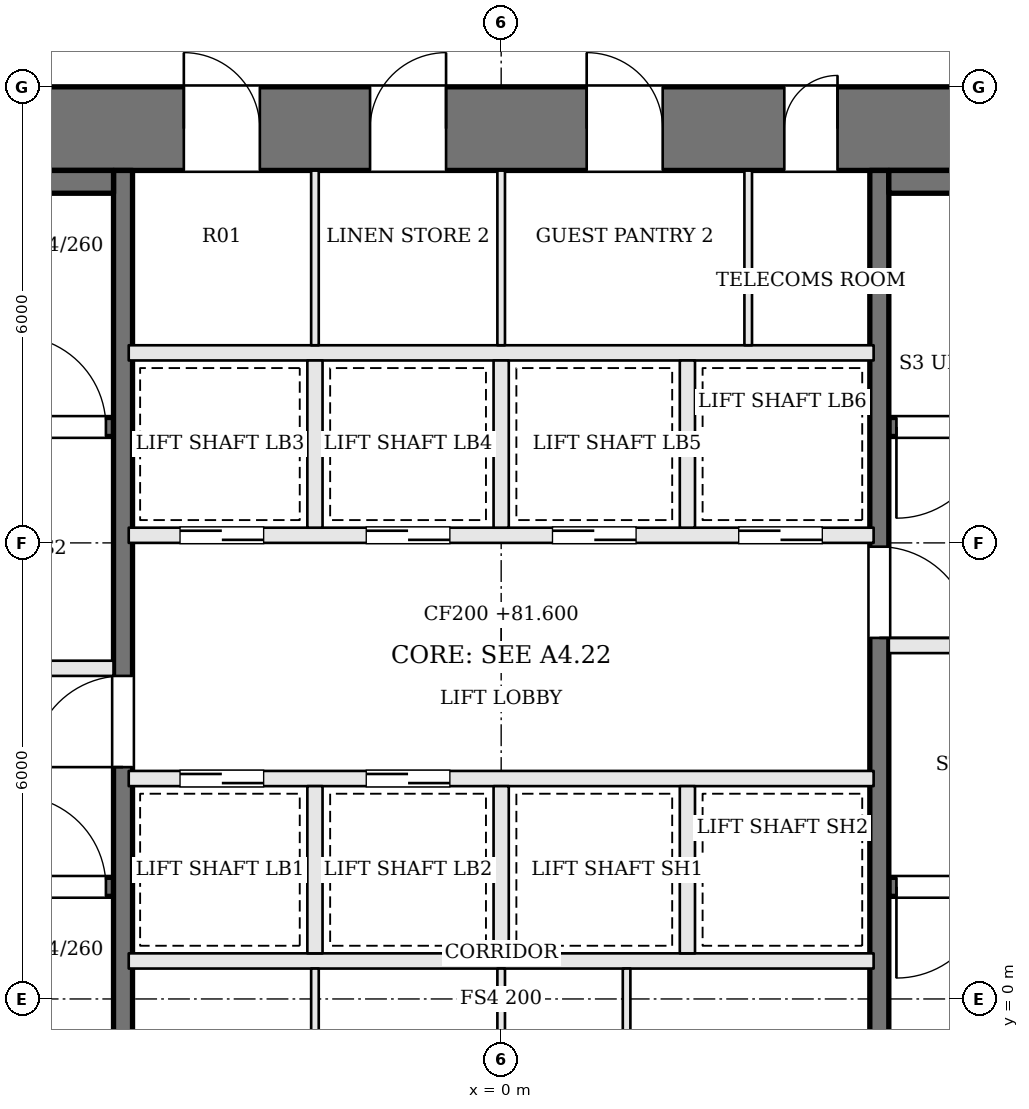
"""IFC4 building model, lengths in metres.
Left out: names, types, materials, properties, quantities, classifications, styles, units other than length and angle.
Written with IfcOpenShell. Run it as: python <this file> out.ifc"""

import sys

from ifc_helpers import new_model, si_unit, direction, frame, frame_2d, origin, place, context, subcontext, project, spatial, rectangle, extrude, element, fill, save


model = new_model("IFC4")
c1 = context("Model", 3, precision=1e-05, world=origin(), true_north=direction((0.0, 1.0)))
c2 = subcontext(c1, "Body", "Model", "MODEL_VIEW")
j1 = project(units=[si_unit("LENGTHUNIT", "METRE"), si_unit("PLANEANGLEUNIT", "RADIAN")], contexts=[c1])
p1 = place(None, origin())
s1 = spatial("IfcSite", under=j1, at=p1, CompositionType="ELEMENT")
p2 = place(p1, origin())
s2 = spatial("IfcBuilding", under=s1, at=p2, CompositionType="ELEMENT")
p3 = place(p2, frame((0.0, 0.0, 81.6)))
s3 = spatial("IfcBuildingStorey", under=s2, at=p3, CompositionType="ELEMENT", Elevation=81.6)
p4 = place(p3, frame((-13.0, 11.45, 0.0), z_axis=(0.0, 0.0, 1.0), x_axis=(1.0, 0.0, 0.0)))
e1 = element("IfcWall", 1, at=p4, inside=s3, PredefinedType="SHEAR", context=c2, shape_type="SweptSolid", body=[
    extrude(rectangle(XDim=26.0, YDim=1.1, at=frame_2d((13.0, 0.0))), origin(), (0.0, 0.0, 1.0), 3.6),
])
p5 = place(p4, frame((8.825, 0.0, 0.0)))
e2 = element("IfcOpeningElement", 2, at=p5, cuts=e1, PredefinedType="OPENING", context=c2, shape_type="SweptSolid", body=[
    extrude(rectangle(XDim=1.0, YDim=2.1, at=frame_2d((0.5, 1.05))), frame((0.0, 0.56, 0.0), z_axis=(0.0, -1.0, 0.0), x_axis=(1.0, 0.0, 0.0)), (0.0, 0.0, 1.0), 1.12),
])
p6 = place(p4, frame((11.275, 0.0, 0.0)))
e3 = element("IfcOpeningElement", 3, at=p6, cuts=e1, PredefinedType="OPENING", context=c2, shape_type="SweptSolid", body=[
    extrude(rectangle(XDim=1.0, YDim=2.1, at=frame_2d((0.5, 1.05))), frame((0.0, 0.56, 0.0), z_axis=(0.0, -1.0, 0.0), x_axis=(1.0, 0.0, 0.0)), (0.0, 0.0, 1.0), 1.12),
])
p7 = place(p4, frame((14.125, 0.0, 0.0)))
e4 = element("IfcOpeningElement", 4, at=p7, cuts=e1, PredefinedType="OPENING", context=c2, shape_type="SweptSolid", body=[
    extrude(rectangle(XDim=1.0, YDim=2.1, at=frame_2d((0.5, 1.05))), frame((0.0, 0.56, 0.0), z_axis=(0.0, -1.0, 0.0), x_axis=(1.0, 0.0, 0.0)), (0.0, 0.0, 1.0), 1.12),
])
p8 = place(p4, frame((16.725, 0.0, 0.0)))
e5 = element("IfcOpeningElement", 5, at=p8, cuts=e1, PredefinedType="OPENING", context=c2, shape_type="SweptSolid", body=[
    extrude(rectangle(XDim=0.7, YDim=2.1, at=frame_2d((0.35, 1.05))), frame((0.0, 0.56, 0.0), z_axis=(0.0, -1.0, 0.0), x_axis=(1.0, 0.0, 0.0)), (0.0, 0.0, 1.0), 1.12),
])
p9 = place(p3, frame((-11.9, 1.475, 0.0), z_axis=(0.0, 0.0, 1.0), x_axis=(1.0, 0.0, 0.0)))
e6 = element("IfcWall", 6, at=p9, inside=s3, PredefinedType="SOLIDWALL", context=c2, shape_type="SweptSolid", body=[
    extrude(rectangle(XDim=6.8, YDim=0.25, at=frame_2d((3.4, 0.0))), origin(), (0.0, 0.0, 1.0), 3.4),
])
p10 = place(p9, frame((5.5, 0.0, 0.0)))
e7 = element("IfcOpeningElement", 7, at=p10, cuts=e6, PredefinedType="OPENING", context=c2, shape_type="SweptSolid", body=[
    extrude(rectangle(XDim=1.2, YDim=2.1, at=frame_2d((0.6, 1.05))), frame((0.0, 0.135, 0.0), z_axis=(0.0, -1.0, 0.0), x_axis=(1.0, 0.0, 0.0)), (0.0, 0.0, 1.0), 0.27),
])
p11 = place(p3, frame((11.9, 7.525, 0.0), z_axis=(0.0, 0.0, 1.0), x_axis=(-1.0, 0.0, 0.0)))
e8 = element("IfcWall", 8, at=p11, inside=s3, PredefinedType="SOLIDWALL", context=c2, shape_type="SweptSolid", body=[
    extrude(rectangle(XDim=6.8, YDim=0.25, at=frame_2d((3.4, 0.0))), origin(), (0.0, 0.0, 1.0), 3.4),
])
p12 = place(p11, frame((5.5, 0.0, 0.0)))
e9 = element("IfcOpeningElement", 9, at=p12, cuts=e8, PredefinedType="OPENING", context=c2, shape_type="SweptSolid", body=[
    extrude(rectangle(XDim=1.2, YDim=2.1, at=frame_2d((0.6, 1.05))), frame((0.0, 0.135, 0.0), z_axis=(0.0, -1.0, 0.0), x_axis=(1.0, 0.0, 0.0)), (0.0, 0.0, 1.0), 0.27),
])
p13 = place(p3, frame((-11.9, 4.35, 0.0), z_axis=(0.0, 0.0, 1.0), x_axis=(1.0, 0.0, 0.0)))
e10 = element("IfcWall", 10, at=p13, inside=s3, PredefinedType="SOLIDWALL", context=c2, shape_type="SweptSolid", body=[
    extrude(rectangle(XDim=6.8, YDim=0.2, at=frame_2d((3.4, 0.0))), origin(), (0.0, 0.0, 1.0), 3.4),
])
p14 = place(p13, frame((4.1, 0.0, 0.0)))
e11 = element("IfcOpeningElement", 11, at=p14, cuts=e10, PredefinedType="OPENING", context=c2, shape_type="SweptSolid", body=[
    extrude(rectangle(XDim=1.2, YDim=2.1, at=frame_2d((0.6, 1.05))), frame((0.0, 0.11, 0.0), z_axis=(0.0, -1.0, 0.0), x_axis=(1.0, 0.0, 0.0)), (0.0, 0.0, 1.0), 0.22),
])
p15 = place(p13, frame((0.8, 0.0, 0.0)))
e12 = element("IfcOpeningElement", 12, at=p15, cuts=e10, PredefinedType="OPENING", context=c2, shape_type="SweptSolid", body=[
    extrude(rectangle(XDim=1.2, YDim=2.1, at=frame_2d((0.6, 1.05))), frame((0.0, 0.11, 0.0), z_axis=(0.0, -1.0, 0.0), x_axis=(1.0, 0.0, 0.0)), (0.0, 0.0, 1.0), 0.22),
])
p16 = place(p3, frame((11.9, 4.65, 0.0), z_axis=(0.0, 0.0, 1.0), x_axis=(-1.0, 0.0, 0.0)))
e13 = element("IfcWall", 13, at=p16, inside=s3, PredefinedType="SOLIDWALL", context=c2, shape_type="SweptSolid", body=[
    extrude(rectangle(XDim=6.8, YDim=0.2, at=frame_2d((3.4, 0.0))), origin(), (0.0, 0.0, 1.0), 3.4),
])
p17 = place(p16, frame((4.1, 0.0, 0.0)))
e14 = element("IfcOpeningElement", 14, at=p17, cuts=e13, PredefinedType="OPENING", context=c2, shape_type="SweptSolid", body=[
    extrude(rectangle(XDim=1.2, YDim=2.1, at=frame_2d((0.6, 1.05))), frame((0.0, 0.11, 0.0), z_axis=(0.0, -1.0, 0.0), x_axis=(1.0, 0.0, 0.0)), (0.0, 0.0, 1.0), 0.22),
])
p18 = place(p16, frame((0.8, 0.0, 0.0)))
e15 = element("IfcOpeningElement", 15, at=p18, cuts=e13, PredefinedType="OPENING", context=c2, shape_type="SweptSolid", body=[
    extrude(rectangle(XDim=1.2, YDim=2.1, at=frame_2d((0.6, 1.05))), frame((0.0, 0.11, 0.0), z_axis=(0.0, -1.0, 0.0), x_axis=(1.0, 0.0, 0.0)), (0.0, 0.0, 1.0), 0.22),
])
p19 = place(p3, frame((-11.9, 7.525, 0.0), z_axis=(0.0, 0.0, 1.0), x_axis=(1.0, 0.0, 0.0)))
e16 = element("IfcWall", 16, at=p19, inside=s3, PredefinedType="SOLIDWALL", context=c2, shape_type="SweptSolid", body=[
    extrude(rectangle(XDim=6.8, YDim=0.25, at=frame_2d((3.4, 0.0))), origin(), (0.0, 0.0, 1.0), 3.4),
])
p20 = place(p19, frame((5.5, 0.0, 0.0)))
e17 = element("IfcOpeningElement", 17, at=p20, cuts=e16, PredefinedType="OPENING", context=c2, shape_type="SweptSolid", body=[
    extrude(rectangle(XDim=1.2, YDim=2.1, at=frame_2d((0.6, 1.05))), frame((0.0, 0.135, 0.0), z_axis=(0.0, -1.0, 0.0), x_axis=(1.0, 0.0, 0.0)), (0.0, 0.0, 1.0), 0.27),
])
p21 = place(p3, frame((11.9, 1.475, 0.0), z_axis=(0.0, 0.0, 1.0), x_axis=(-1.0, 0.0, 0.0)))
e18 = element("IfcWall", 18, at=p21, inside=s3, PredefinedType="SOLIDWALL", context=c2, shape_type="SweptSolid", body=[
    extrude(rectangle(XDim=6.8, YDim=0.25, at=frame_2d((3.4, 0.0))), origin(), (0.0, 0.0, 1.0), 3.4),
])
p22 = place(p21, frame((5.5, 0.0, 0.0)))
e19 = element("IfcOpeningElement", 19, at=p22, cuts=e18, PredefinedType="OPENING", context=c2, shape_type="SweptSolid", body=[
    extrude(rectangle(XDim=1.2, YDim=2.1, at=frame_2d((0.6, 1.05))), frame((0.0, 0.135, 0.0), z_axis=(0.0, -1.0, 0.0), x_axis=(1.0, 0.0, 0.0)), (0.0, 0.0, 1.0), 0.27),
])
p23 = place(p3, frame((-4.975, -1.9, 0.0), z_axis=(0.0, 0.0, 1.0), x_axis=(0.0, 1.0, 0.0)))
e20 = element("IfcWall", 20, at=p23, inside=s3, PredefinedType="SOLIDWALL", context=c2, shape_type="SweptSolid", body=[
    extrude(rectangle(XDim=12.8, YDim=0.25, at=frame_2d((6.4, 0.0))), origin(), (0.0, 0.0, 1.0), 3.4),
])
p24 = place(p23, frame((4.95, 0.0, 0.0)))
e21 = element("IfcOpeningElement", 21, at=p24, cuts=e20, PredefinedType="OPENING", context=c2, shape_type="SweptSolid", body=[
    extrude(rectangle(XDim=1.2, YDim=2.1, at=frame_2d((0.6, 1.05))), frame((0.0, 0.135, 0.0), z_axis=(0.0, -1.0, 0.0), x_axis=(1.0, 0.0, 0.0)), (0.0, 0.0, 1.0), 0.27),
])
p25 = place(p3, frame((4.975, 10.9, 0.0), z_axis=(0.0, 0.0, 1.0), x_axis=(0.0, -1.0, 0.0)))
e22 = element("IfcWall", 22, at=p25, inside=s3, PredefinedType="SOLIDWALL", context=c2, shape_type="SweptSolid", body=[
    extrude(rectangle(XDim=12.8, YDim=0.25, at=frame_2d((6.4, 0.0))), origin(), (0.0, 0.0, 1.0), 3.4),
])
p26 = place(p25, frame((4.95, 0.0, 0.0)))
e23 = element("IfcOpeningElement", 23, at=p26, cuts=e22, PredefinedType="OPENING", context=c2, shape_type="SweptSolid", body=[
    extrude(rectangle(XDim=1.2, YDim=2.1, at=frame_2d((0.6, 1.05))), frame((0.0, 0.135, 0.0), z_axis=(0.0, -1.0, 0.0), x_axis=(1.0, 0.0, 0.0)), (0.0, 0.0, 1.0), 0.27),
])
for number, where, z_axis, x_axis in (
    (24, (-11.9, 10.75, 0.0), (0.0, 0.0, 1.0), (1.0, 0.0, 0.0)),
    (25, (11.9, 10.75, 0.0), (0.0, 0.0, 1.0), (-1.0, 0.0, 0.0)),
):
    element("IfcWall", number, at=place(p3, frame(where, z_axis=z_axis, x_axis=x_axis)), inside=s3, PredefinedType="SOLIDWALL", context=c2, shape_type="SweptSolid", body=[
        extrude(rectangle(XDim=6.8, YDim=0.3, at=frame_2d((3.4, 0.0))), origin(), (0.0, 0.0, 1.0), 3.4),
    ])
p27 = place(p3, frame((-4.9, 0.5, 0.0), z_axis=(0.0, 0.0, 1.0), x_axis=(1.0, 0.0, 0.0)))
e26 = element("IfcWall", 26, at=p27, inside=s3, PredefinedType="SOLIDWALL", context=c2, shape_type="SweptSolid", body=[
    extrude(rectangle(XDim=9.8, YDim=0.2, at=frame_2d((4.9, 0.0))), origin(), (0.0, 0.0, 1.0), 3.4),
])
p28 = place(p3, frame((-4.9, 2.9, 0.0), z_axis=(0.0, 0.0, 1.0), x_axis=(1.0, 0.0, 0.0)))
e27 = element("IfcWall", 27, at=p28, inside=s3, PredefinedType="SOLIDWALL", context=c2, shape_type="SweptSolid", body=[
    extrude(rectangle(XDim=9.8, YDim=0.2, at=frame_2d((4.9, 0.0))), origin(), (0.0, 0.0, 1.0), 3.4),
])
p29 = place(p28, frame((0.675, 0.0, 0.0)))
e28 = element("IfcOpeningElement", 28, at=p29, cuts=e27, PredefinedType="OPENING", context=c2, shape_type="SweptSolid", body=[
    extrude(rectangle(XDim=1.1, YDim=2.1, at=frame_2d((0.55, 1.05))), frame((0.0, 0.11, 0.0), z_axis=(0.0, -1.0, 0.0), x_axis=(1.0, 0.0, 0.0)), (0.0, 0.0, 1.0), 0.22),
])
p30 = place(p28, frame((3.125, 0.0, 0.0)))
e29 = element("IfcOpeningElement", 29, at=p30, cuts=e27, PredefinedType="OPENING", context=c2, shape_type="SweptSolid", body=[
    extrude(rectangle(XDim=1.1, YDim=2.1, at=frame_2d((0.55, 1.05))), frame((0.0, 0.11, 0.0), z_axis=(0.0, -1.0, 0.0), x_axis=(1.0, 0.0, 0.0)), (0.0, 0.0, 1.0), 0.22),
])
p31 = place(p3, frame((-4.9, 6.1, 0.0), z_axis=(0.0, 0.0, 1.0), x_axis=(1.0, 0.0, 0.0)))
e30 = element("IfcWall", 30, at=p31, inside=s3, PredefinedType="SOLIDWALL", context=c2, shape_type="SweptSolid", body=[
    extrude(rectangle(XDim=9.8, YDim=0.2, at=frame_2d((4.9, 0.0))), origin(), (0.0, 0.0, 1.0), 3.4),
])
p32 = place(p31, frame((0.675, 0.0, 0.0)))
e31 = element("IfcOpeningElement", 31, at=p32, cuts=e30, PredefinedType="OPENING", context=c2, shape_type="SweptSolid", body=[
    extrude(rectangle(XDim=1.1, YDim=2.1, at=frame_2d((0.55, 1.05))), frame((0.0, 0.11, 0.0), z_axis=(0.0, -1.0, 0.0), x_axis=(1.0, 0.0, 0.0)), (0.0, 0.0, 1.0), 0.22),
])
p33 = place(p31, frame((3.125, 0.0, 0.0)))
e32 = element("IfcOpeningElement", 32, at=p33, cuts=e30, PredefinedType="OPENING", context=c2, shape_type="SweptSolid", body=[
    extrude(rectangle(XDim=1.1, YDim=2.1, at=frame_2d((0.55, 1.05))), frame((0.0, 0.11, 0.0), z_axis=(0.0, -1.0, 0.0), x_axis=(1.0, 0.0, 0.0)), (0.0, 0.0, 1.0), 0.22),
])
p34 = place(p31, frame((5.575, 0.0, 0.0)))
e33 = element("IfcOpeningElement", 33, at=p34, cuts=e30, PredefinedType="OPENING", context=c2, shape_type="SweptSolid", body=[
    extrude(rectangle(XDim=1.1, YDim=2.1, at=frame_2d((0.55, 1.05))), frame((0.0, 0.11, 0.0), z_axis=(0.0, -1.0, 0.0), x_axis=(1.0, 0.0, 0.0)), (0.0, 0.0, 1.0), 0.22),
])
p35 = place(p31, frame((8.025, 0.0, 0.0)))
e34 = element("IfcOpeningElement", 34, at=p35, cuts=e30, PredefinedType="OPENING", context=c2, shape_type="SweptSolid", body=[
    extrude(rectangle(XDim=1.1, YDim=2.1, at=frame_2d((0.55, 1.05))), frame((0.0, 0.11, 0.0), z_axis=(0.0, -1.0, 0.0), x_axis=(1.0, 0.0, 0.0)), (0.0, 0.0, 1.0), 0.22),
])
p36 = place(p3, frame((-4.9, 8.5, 0.0), z_axis=(0.0, 0.0, 1.0), x_axis=(1.0, 0.0, 0.0)))
e35 = element("IfcWall", 35, at=p36, inside=s3, PredefinedType="SOLIDWALL", context=c2, shape_type="SweptSolid", body=[
    extrude(rectangle(XDim=9.8, YDim=0.2, at=frame_2d((4.9, 0.0))), origin(), (0.0, 0.0, 1.0), 3.4),
])
for number, where, z_axis, x_axis in (
    (36, (-2.45, 0.6, 0.0), (0.0, 0.0, 1.0), (0.0, 1.0, 0.0)),
    (37, (0.0, 0.6, 0.0), (0.0, 0.0, 1.0), (0.0, 1.0, 0.0)),
    (38, (2.45, 0.6, 0.0), (0.0, 0.0, 1.0), (0.0, 1.0, 0.0)),
    (39, (-2.45, 6.2, 0.0), (0.0, 0.0, 1.0), (0.0, 1.0, 0.0)),
    (40, (0.0, 6.2, 0.0), (0.0, 0.0, 1.0), (0.0, 1.0, 0.0)),
    (41, (2.45, 6.2, 0.0), (0.0, 0.0, 1.0), (0.0, 1.0, 0.0)),
):
    element("IfcWall", number, at=place(p3, frame(where, z_axis=z_axis, x_axis=x_axis)), inside=s3, PredefinedType="SOLIDWALL", context=c2, shape_type="SweptSolid", body=[
        extrude(rectangle(XDim=2.2, YDim=0.2, at=frame_2d((1.1, 0.0))), origin(), (0.0, 0.0, 1.0), 3.4),
    ])
for number, where, z_axis, x_axis in (
    (42, (-2.45, -1.9, 0.0), (0.0, 0.0, 1.0), (0.0, 1.0, 0.0)),
    (43, (0.0, -1.9, 0.0), (0.0, 0.0, 1.0), (0.0, 1.0, 0.0)),
    (44, (1.65, -1.9, 0.0), (0.0, 0.0, 1.0), (0.0, 1.0, 0.0)),
    (45, (-2.45, 8.6, 0.0), (0.0, 0.0, 1.0), (0.0, 1.0, 0.0)),
    (46, (0.0, 8.6, 0.0), (0.0, 0.0, 1.0), (0.0, 1.0, 0.0)),
    (47, (3.25, 8.6, 0.0), (0.0, 0.0, 1.0), (0.0, 1.0, 0.0)),
):
    element("IfcWall", number, at=place(p3, frame(where, z_axis=z_axis, x_axis=x_axis)), inside=s3, PredefinedType="PARTITIONING", context=c2, shape_type="SweptSolid", body=[
        extrude(rectangle(XDim=2.3, YDim=0.1, at=frame_2d((1.15, 0.0))), origin(), (0.0, 0.0, 1.0), 3.4),
    ])
p37 = place(p24, origin())
e48 = element("IfcDoor", 48, at=p37, inside=s3, OperationType="SINGLE_SWING_LEFT", PredefinedType="DOOR", context=c2, shape_type="SweptSolid", body=[
    extrude(rectangle(XDim=1.2, YDim=2.1, at=frame_2d((0.6, 1.05))), frame((0.0, 0.025, 0.0), z_axis=(0.0, -1.0, 0.0), x_axis=(1.0, 0.0, 0.0)), (0.0, 0.0, 1.0), 0.05),
])
fill(e21, e48)
p38 = place(p26, origin())
e49 = element("IfcDoor", 49, at=p38, inside=s3, OperationType="SINGLE_SWING_RIGHT", PredefinedType="DOOR", context=c2, shape_type="SweptSolid", body=[
    extrude(rectangle(XDim=1.2, YDim=2.1, at=frame_2d((0.6, 1.05))), frame((0.0, 0.025, 0.0), z_axis=(0.0, -1.0, 0.0), x_axis=(1.0, 0.0, 0.0)), (0.0, 0.0, 1.0), 0.05),
])
fill(e23, e49)
p39 = place(p10, origin())
e50 = element("IfcDoor", 50, at=p39, inside=s3, OperationType="SINGLE_SWING_LEFT", PredefinedType="DOOR", context=c2, shape_type="SweptSolid", body=[
    extrude(rectangle(XDim=1.2, YDim=2.1, at=frame_2d((0.6, 1.05))), frame((0.0, 0.025, 0.0), z_axis=(0.0, -1.0, 0.0), x_axis=(1.0, 0.0, 0.0)), (0.0, 0.0, 1.0), 0.05),
])
fill(e7, e50)
p40 = place(p12, origin())
e51 = element("IfcDoor", 51, at=p40, inside=s3, OperationType="SINGLE_SWING_RIGHT", PredefinedType="DOOR", context=c2, shape_type="SweptSolid", body=[
    extrude(rectangle(XDim=1.2, YDim=2.1, at=frame_2d((0.6, 1.05))), frame((0.0, 0.025, 0.0), z_axis=(0.0, -1.0, 0.0), x_axis=(1.0, 0.0, 0.0)), (0.0, 0.0, 1.0), 0.05),
])
fill(e9, e51)
p41 = place(p20, origin())
e52 = element("IfcDoor", 52, at=p41, inside=s3, OperationType="SINGLE_SWING_LEFT", PredefinedType="DOOR", context=c2, shape_type="SweptSolid", body=[
    extrude(rectangle(XDim=1.2, YDim=2.1, at=frame_2d((0.6, 1.05))), frame((0.0, 0.025, 0.0), z_axis=(0.0, -1.0, 0.0), x_axis=(1.0, 0.0, 0.0)), (0.0, 0.0, 1.0), 0.05),
])
fill(e17, e52)
p42 = place(p22, origin())
e53 = element("IfcDoor", 53, at=p42, inside=s3, OperationType="SINGLE_SWING_RIGHT", PredefinedType="DOOR", context=c2, shape_type="SweptSolid", body=[
    extrude(rectangle(XDim=1.2, YDim=2.1, at=frame_2d((0.6, 1.05))), frame((0.0, 0.025, 0.0), z_axis=(0.0, -1.0, 0.0), x_axis=(1.0, 0.0, 0.0)), (0.0, 0.0, 1.0), 0.05),
])
fill(e19, e53)
p43 = place(p29, origin())
e54 = element("IfcDoor", 54, at=p43, inside=s3, OperationType="SLIDING_TO_RIGHT", PredefinedType="DOOR", context=c2, shape_type="SweptSolid", body=[
    extrude(rectangle(XDim=1.1, YDim=2.1, at=frame_2d((0.55, 1.05))), frame((0.0, 0.025, 0.0), z_axis=(0.0, -1.0, 0.0), x_axis=(1.0, 0.0, 0.0)), (0.0, 0.0, 1.0), 0.05),
])
fill(e28, e54)
p44 = place(p30, origin())
e55 = element("IfcDoor", 55, at=p44, inside=s3, OperationType="SLIDING_TO_LEFT", PredefinedType="DOOR", context=c2, shape_type="SweptSolid", body=[
    extrude(rectangle(XDim=1.1, YDim=2.1, at=frame_2d((0.55, 1.05))), frame((0.0, 0.025, 0.0), z_axis=(0.0, -1.0, 0.0), x_axis=(1.0, 0.0, 0.0)), (0.0, 0.0, 1.0), 0.05),
])
fill(e29, e55)
p45 = place(p32, origin())
e56 = element("IfcDoor", 56, at=p45, inside=s3, OperationType="SLIDING_TO_RIGHT", PredefinedType="DOOR", context=c2, shape_type="SweptSolid", body=[
    extrude(rectangle(XDim=1.1, YDim=2.1, at=frame_2d((0.55, 1.05))), frame((0.0, 0.025, 0.0), z_axis=(0.0, -1.0, 0.0), x_axis=(1.0, 0.0, 0.0)), (0.0, 0.0, 1.0), 0.05),
])
fill(e31, e56)
p46 = place(p33, origin())
e57 = element("IfcDoor", 57, at=p46, inside=s3, OperationType="SLIDING_TO_LEFT", PredefinedType="DOOR", context=c2, shape_type="SweptSolid", body=[
    extrude(rectangle(XDim=1.1, YDim=2.1, at=frame_2d((0.55, 1.05))), frame((0.0, 0.025, 0.0), z_axis=(0.0, -1.0, 0.0), x_axis=(1.0, 0.0, 0.0)), (0.0, 0.0, 1.0), 0.05),
])
fill(e32, e57)
p47 = place(p34, origin())
e58 = element("IfcDoor", 58, at=p47, inside=s3, OperationType="SLIDING_TO_RIGHT", PredefinedType="DOOR", context=c2, shape_type="SweptSolid", body=[
    extrude(rectangle(XDim=1.1, YDim=2.1, at=frame_2d((0.55, 1.05))), frame((0.0, 0.025, 0.0), z_axis=(0.0, -1.0, 0.0), x_axis=(1.0, 0.0, 0.0)), (0.0, 0.0, 1.0), 0.05),
])
fill(e33, e58)
p48 = place(p35, origin())
e59 = element("IfcDoor", 59, at=p48, inside=s3, OperationType="SLIDING_TO_LEFT", PredefinedType="DOOR", context=c2, shape_type="SweptSolid", body=[
    extrude(rectangle(XDim=1.1, YDim=2.1, at=frame_2d((0.55, 1.05))), frame((0.0, 0.025, 0.0), z_axis=(0.0, -1.0, 0.0), x_axis=(1.0, 0.0, 0.0)), (0.0, 0.0, 1.0), 0.05),
])
fill(e34, e59)
p49 = place(p5, origin())
e60 = element("IfcDoor", 60, at=p49, inside=s3, OperationType="SINGLE_SWING_LEFT", PredefinedType="DOOR", context=c2, shape_type="SweptSolid", body=[
    extrude(rectangle(XDim=1.0, YDim=2.1, at=frame_2d((0.5, 1.05))), frame((0.0, 0.025, 0.0), z_axis=(0.0, -1.0, 0.0), x_axis=(1.0, 0.0, 0.0)), (0.0, 0.0, 1.0), 0.05),
])
fill(e2, e60)
p50 = place(p6, origin())
e61 = element("IfcDoor", 61, at=p50, inside=s3, OperationType="SINGLE_SWING_RIGHT", PredefinedType="DOOR", context=c2, shape_type="SweptSolid", body=[
    extrude(rectangle(XDim=1.0, YDim=2.1, at=frame_2d((0.5, 1.05))), frame((0.0, 0.025, 0.0), z_axis=(0.0, -1.0, 0.0), x_axis=(1.0, 0.0, 0.0)), (0.0, 0.0, 1.0), 0.05),
])
fill(e3, e61)
p51 = place(p7, origin())
e62 = element("IfcDoor", 62, at=p51, inside=s3, OperationType="SINGLE_SWING_LEFT", PredefinedType="DOOR", context=c2, shape_type="SweptSolid", body=[
    extrude(rectangle(XDim=1.0, YDim=2.1, at=frame_2d((0.5, 1.05))), frame((0.0, 0.025, 0.0), z_axis=(0.0, -1.0, 0.0), x_axis=(1.0, 0.0, 0.0)), (0.0, 0.0, 1.0), 0.05),
])
fill(e4, e62)
p52 = place(p8, origin())
e63 = element("IfcDoor", 63, at=p52, inside=s3, OperationType="SINGLE_SWING_RIGHT", PredefinedType="DOOR", context=c2, shape_type="SweptSolid", body=[
    extrude(rectangle(XDim=0.7, YDim=2.1, at=frame_2d((0.35, 1.05))), frame((0.0, 0.025, 0.0), z_axis=(0.0, -1.0, 0.0), x_axis=(1.0, 0.0, 0.0)), (0.0, 0.0, 1.0), 0.05),
])
fill(e5, e63)
save(model, sys.argv[1])
